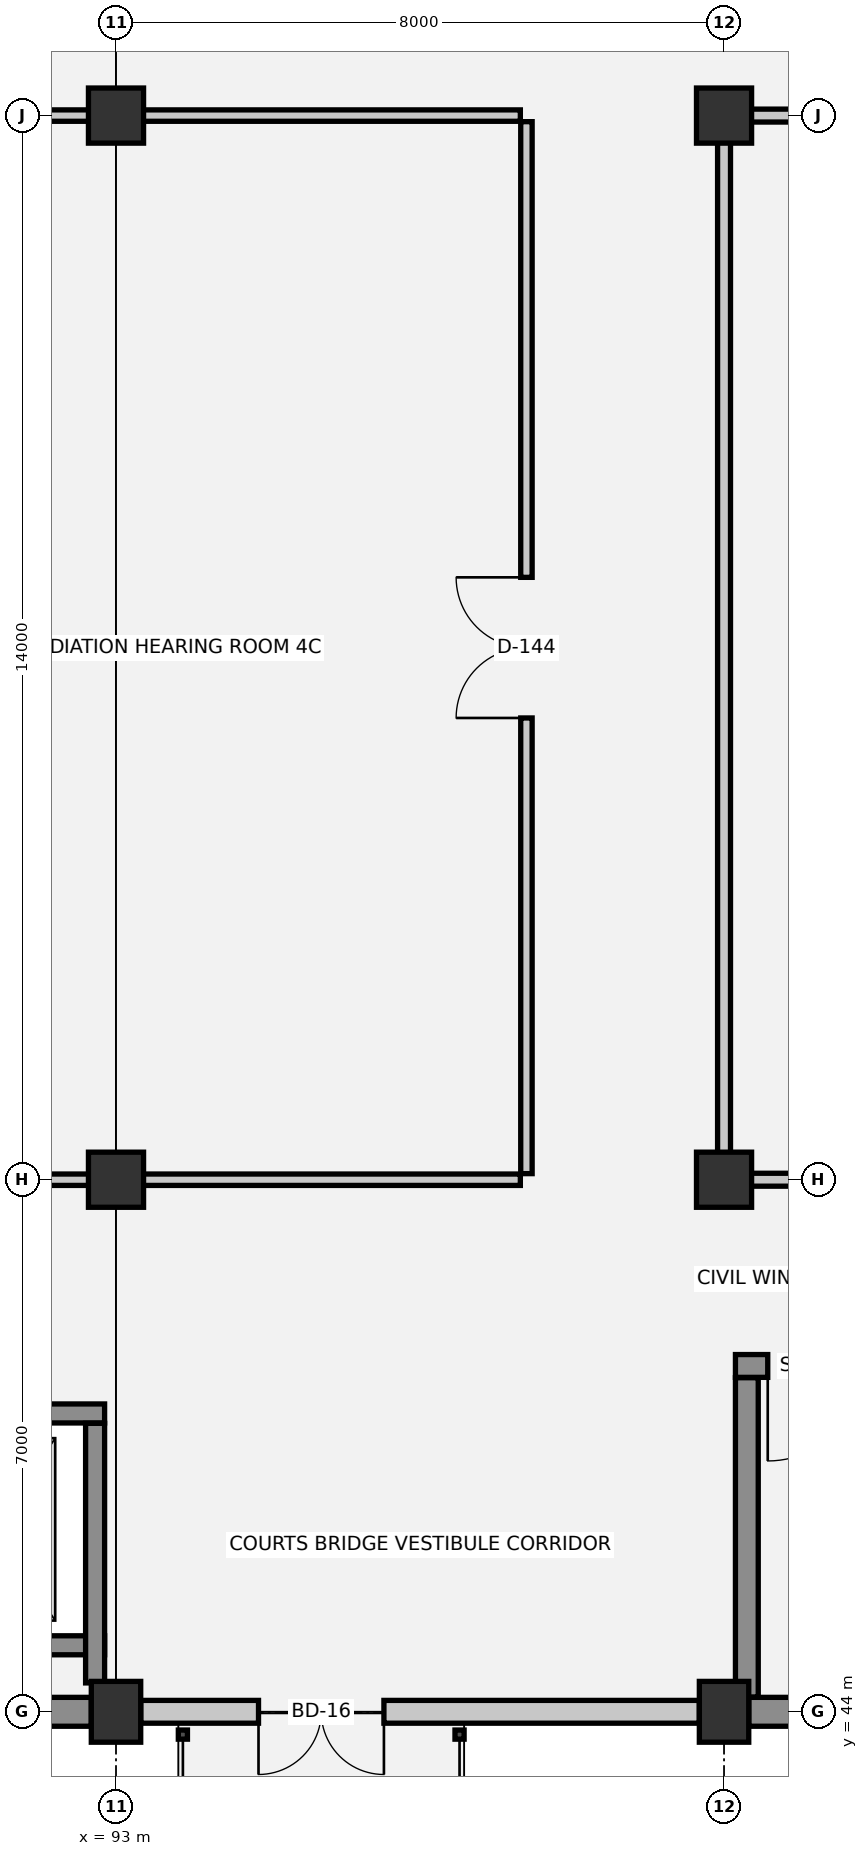
"""IFC4 building model, lengths in metres.
Left out: names, types, materials, properties, quantities, classifications, styles, units other than length and angle.
Written with IfcOpenShell. Run it as: python <this file> out.ifc"""

import sys

from ifc_helpers import new_model, si_unit, direction, frame, frame_2d, origin, origin_2d, place, context, subcontext, project, spatial, rectangle, extrude, element, fill, save


model = new_model("IFC4")
c1 = context("Model", 3, precision=1e-05, world=origin(), true_north=direction((0.0, 1.0)))
c2 = subcontext(c1, "Body", "Model", "MODEL_VIEW")
j1 = project(units=[si_unit("LENGTHUNIT", "METRE"), si_unit("PLANEANGLEUNIT", "RADIAN")], contexts=[c1])
p1 = place(None, origin())
s1 = spatial("IfcSite", under=j1, at=p1, CompositionType="ELEMENT")
p2 = place(p1, origin())
s2 = spatial("IfcBuilding", under=s1, at=p2, CompositionType="ELEMENT")
p3 = place(p2, frame((0.0, 0.0, 14.4)))
s3 = spatial("IfcBuildingStorey", under=s2, at=p3, CompositionType="ELEMENT", Elevation=14.4)
p4 = place(p3, frame((93.0, 44.0, 0.0), z_axis=(0.0, 0.0, 1.0), x_axis=(1.0, 0.0, 0.0)))
e1 = element("IfcColumn", 1, at=p4, inside=s3, PredefinedType="COLUMN", context=c2, shape_type="SweptSolid", body=[
    extrude(rectangle(XDim=0.65, YDim=0.8, at=origin_2d()), origin(), (0.0, 0.0, 1.0), 3.9),
])
for number, where, z_axis, x_axis in (
    (2, (93.0, 51.0, 0.0), (0.0, 0.0, 1.0), (1.0, 0.0, 0.0)),
    (3, (93.0, 65.0, 0.0), (0.0, 0.0, 1.0), (1.0, 0.0, 0.0)),
):
    element("IfcColumn", number, at=place(p3, frame(where, z_axis=z_axis, x_axis=x_axis)), inside=s3, PredefinedType="COLUMN", context=c2, shape_type="SweptSolid", body=[
        extrude(rectangle(XDim=0.725, YDim=0.725, at=origin_2d()), origin(), (0.0, 0.0, 1.0), 3.9),
    ])
p5 = place(p3, frame((101.0, 44.0, 0.0), z_axis=(0.0, 0.0, 1.0), x_axis=(1.0, 0.0, 0.0)))
e4 = element("IfcColumn", 4, at=p5, inside=s3, PredefinedType="COLUMN", context=c2, shape_type="SweptSolid", body=[
    extrude(rectangle(XDim=0.65, YDim=0.8, at=origin_2d()), origin(), (0.0, 0.0, 1.0), 3.9),
])
for number, where, z_axis, x_axis in (
    (5, (101.0, 51.0, 0.0), (0.0, 0.0, 1.0), (1.0, 0.0, 0.0)),
    (6, (101.0, 65.0, 0.0), (0.0, 0.0, 1.0), (1.0, 0.0, 0.0)),
):
    element("IfcColumn", number, at=place(p3, frame(where, z_axis=z_axis, x_axis=x_axis)), inside=s3, PredefinedType="COLUMN", context=c2, shape_type="SweptSolid", body=[
        extrude(rectangle(XDim=0.725, YDim=0.725, at=origin_2d()), origin(), (0.0, 0.0, 1.0), 3.9),
    ])
p6 = place(p3, frame((108.675, 44.0, 0.0), z_axis=(0.0, 0.0, 1.0), x_axis=(-1.0, 0.0, 0.0)))
e7 = element("IfcWall", 7, at=p6, inside=s3, PredefinedType="STANDARD", context=c2, shape_type="SweptSolid", body=[
    extrude(rectangle(XDim=7.35, YDim=0.38, at=frame_2d((3.675, 0.0))), origin(), (0.0, 0.0, 1.0), 2.61),
])
p7 = place(p3, frame((100.675, 44.0, 0.0), z_axis=(0.0, 0.0, 1.0), x_axis=(-1.0, 0.0, 0.0)))
e8 = element("IfcWall", 8, at=p7, inside=s3, PredefinedType="SOLIDWALL", context=c2, shape_type="SweptSolid", body=[
    extrude(rectangle(XDim=7.35, YDim=0.3, at=frame_2d((3.675, 0.0))), origin(), (0.0, 0.0, 1.0), 2.61),
])
p8 = place(p7, frame((4.15, 0.0, 0.0)))
e9 = element("IfcOpeningElement", 9, at=p8, cuts=e8, PredefinedType="OPENING", context=c2, shape_type="SweptSolid", body=[
    extrude(rectangle(XDim=1.65, YDim=2.2, at=frame_2d((0.825, 1.1))), frame((0.0, 0.16, 0.0), z_axis=(0.0, -1.0, 0.0), x_axis=(1.0, 0.0, 0.0)), (0.0, 0.0, 1.0), 0.32),
])
p9 = place(p3, frame((92.675, 44.0, 0.0), z_axis=(0.0, 0.0, 1.0), x_axis=(-1.0, 0.0, 0.0)))
e10 = element("IfcWall", 10, at=p9, inside=s3, PredefinedType="STANDARD", context=c2, shape_type="SweptSolid", body=[
    extrude(rectangle(XDim=7.35, YDim=0.38, at=frame_2d((3.675, 0.0))), origin(), (0.0, 0.0, 1.0), 2.61),
])
for number, where, z_axis, x_axis in (
    (11, (89.95, 44.875, 0.0), (0.0, 0.0, 1.0), (1.0, 0.0, 0.0)),
    (12, (92.85, 47.925, 0.0), (0.0, 0.0, 1.0), (-1.0, 0.0, 0.0)),
):
    element("IfcWall", number, at=place(p3, frame(where, z_axis=z_axis, x_axis=x_axis)), inside=s3, PredefinedType="SHEAR", context=c2, shape_type="SweptSolid", body=[
        extrude(rectangle(XDim=2.9, YDim=0.25, at=frame_2d((1.45, 0.0))), origin(), (0.0, 0.0, 1.0), 3.9),
    ])
p10 = place(p3, frame((92.725, 44.38, 0.0), z_axis=(0.0, 0.0, 1.0), x_axis=(0.0, 1.0, 0.0)))
e13 = element("IfcWall", 13, at=p10, inside=s3, PredefinedType="SHEAR", context=c2, shape_type="SweptSolid", body=[
    extrude(rectangle(XDim=3.415, YDim=0.25, at=frame_2d((1.708, 0.0))), origin(), (0.0, 0.0, 1.0), 3.9),
])
p11 = place(p3, frame((108.85, 48.55, 0.0), z_axis=(0.0, 0.0, 1.0), x_axis=(-1.0, 0.0, 0.0)))
e14 = element("IfcWall", 14, at=p11, inside=s3, PredefinedType="SHEAR", context=c2, shape_type="SweptSolid", body=[
    extrude(rectangle(XDim=7.7, YDim=0.3, at=frame_2d((3.85, 0.0))), origin(), (0.0, 0.0, 1.0), 3.62),
])
p12 = place(p11, frame((6.025, 0.0, 0.0)))
e15 = element("IfcOpeningElement", 15, at=p12, cuts=e14, PredefinedType="OPENING", context=c2, shape_type="SweptSolid", body=[
    extrude(rectangle(XDim=1.25, YDim=2.15, at=frame_2d((0.625, 1.075))), frame((0.0, 0.16, 0.0), z_axis=(0.0, -1.0, 0.0), x_axis=(1.0, 0.0, 0.0)), (0.0, 0.0, 1.0), 0.32),
])
p13 = place(p3, frame((101.3, 48.395, 0.0), z_axis=(0.0, 0.0, 1.0), x_axis=(0.0, -1.0, 0.0)))
e16 = element("IfcWall", 16, at=p13, inside=s3, PredefinedType="SHEAR", context=c2, shape_type="SweptSolid", body=[
    extrude(rectangle(XDim=4.2, YDim=0.3, at=frame_2d((2.1, 0.0))), origin(), (0.0, 0.0, 1.0), 3.62),
])
p14 = place(p3, frame((89.12, 51.0, 0.0), z_axis=(0.0, 0.0, 1.0), x_axis=(1.0, 0.0, 0.0)))
e17 = element("IfcWall", 17, at=p14, inside=s3, PredefinedType="PARTITIONING", context=c2, shape_type="SweptSolid", body=[
    extrude(rectangle(XDim=9.2, YDim=0.15, at=frame_2d((4.6, 0.0))), origin(), (0.0, 0.0, 1.0), 2.93),
])
p15 = place(p3, frame((101.08, 51.0, 0.0), z_axis=(0.0, 0.0, 1.0), x_axis=(1.0, 0.0, 0.0)))
e18 = element("IfcWall", 18, at=p15, inside=s3, PredefinedType="PARTITIONING", context=c2, shape_type="SweptSolid", body=[
    extrude(rectangle(XDim=22.84, YDim=0.17, at=frame_2d((11.42, 0.0))), origin(), (0.0, 0.0, 1.0), 2.93),
])
p16 = place(p15, frame((10.445, 0.0, 0.0)))
e19 = element("IfcOpeningElement", 19, at=p16, cuts=e18, PredefinedType="OPENING", context=c2, shape_type="SweptSolid", body=[
    extrude(rectangle(XDim=1.95, YDim=2.35, at=frame_2d((0.975, 1.175))), frame((0.0, 0.095, 0.0), z_axis=(0.0, -1.0, 0.0), x_axis=(1.0, 0.0, 0.0)), (0.0, 0.0, 1.0), 0.19),
])
p17 = place(p3, frame((89.12, 65.0, 0.0), z_axis=(0.0, 0.0, 1.0), x_axis=(1.0, 0.0, 0.0)))
e20 = element("IfcWall", 20, at=p17, inside=s3, PredefinedType="PARTITIONING", context=c2, shape_type="SweptSolid", body=[
    extrude(rectangle(XDim=9.2, YDim=0.15, at=frame_2d((4.6, 0.0))), origin(), (0.0, 0.0, 1.0), 2.93),
])
p18 = place(p3, frame((101.08, 65.0, 0.0), z_axis=(0.0, 0.0, 1.0), x_axis=(1.0, 0.0, 0.0)))
e21 = element("IfcWall", 21, at=p18, inside=s3, PredefinedType="PARTITIONING", context=c2, shape_type="SweptSolid", body=[
    extrude(rectangle(XDim=22.84, YDim=0.17, at=frame_2d((11.42, 0.0))), origin(), (0.0, 0.0, 1.0), 2.93),
])
p19 = place(p3, frame((98.4, 51.08, 0.0), z_axis=(0.0, 0.0, 1.0), x_axis=(0.0, 1.0, 0.0)))
e22 = element("IfcWall", 22, at=p19, inside=s3, PredefinedType="PARTITIONING", context=c2, shape_type="SweptSolid", body=[
    extrude(rectangle(XDim=13.84, YDim=0.15, at=frame_2d((6.92, 0.0))), origin(), (0.0, 0.0, 1.0), 3.54),
])
p20 = place(p19, frame((5.995, 0.0, 0.0)))
e23 = element("IfcOpeningElement", 23, at=p20, cuts=e22, PredefinedType="OPENING", context=c2, shape_type="SweptSolid", body=[
    extrude(rectangle(XDim=1.85, YDim=2.3, at=frame_2d((0.925, 1.15))), frame((0.0, 0.085, 0.0), z_axis=(0.0, -1.0, 0.0), x_axis=(1.0, 0.0, 0.0)), (0.0, 0.0, 1.0), 0.17),
])
p21 = place(p3, frame((101.0, 51.08, 0.0), z_axis=(0.0, 0.0, 1.0), x_axis=(0.0, 1.0, 0.0)))
e24 = element("IfcWall", 24, at=p21, inside=s3, PredefinedType="PARTITIONING", context=c2, shape_type="SweptSolid", body=[
    extrude(rectangle(XDim=13.84, YDim=0.17, at=frame_2d((6.92, 0.0))), origin(), (0.0, 0.0, 1.0), 2.63),
])
p22 = place(p8, origin())
e25 = element("IfcDoor", 25, at=p22, inside=s3, OperationType="DOUBLE_DOOR_SINGLE_SWING", PredefinedType="DOOR", context=c2, shape_type="SweptSolid", body=[
    extrude(rectangle(XDim=1.65, YDim=2.2, at=frame_2d((0.825, 1.1))), frame((0.0, 0.025, 0.0), z_axis=(0.0, -1.0, 0.0), x_axis=(1.0, 0.0, 0.0)), (0.0, 0.0, 1.0), 0.05),
])
fill(e9, e25)
p23 = place(p12, origin())
e26 = element("IfcDoor", 26, at=p23, inside=s3, OperationType="SINGLE_SWING_RIGHT", PredefinedType="DOOR", context=c2, shape_type="SweptSolid", body=[
    extrude(rectangle(XDim=1.25, YDim=2.15, at=frame_2d((0.625, 1.075))), frame((0.0, 0.025, 0.0), z_axis=(0.0, -1.0, 0.0), x_axis=(1.0, 0.0, 0.0)), (0.0, 0.0, 1.0), 0.05),
])
fill(e15, e26)
p24 = place(p20, origin())
e27 = element("IfcDoor", 27, at=p24, inside=s3, OperationType="DOUBLE_DOOR_SINGLE_SWING", PredefinedType="DOOR", context=c2, shape_type="SweptSolid", body=[
    extrude(rectangle(XDim=1.85, YDim=2.3, at=frame_2d((0.925, 1.15))), frame((0.0, 0.025, 0.0), z_axis=(0.0, -1.0, 0.0), x_axis=(1.0, 0.0, 0.0)), (0.0, 0.0, 1.0), 0.05),
])
fill(e23, e27)
save(model, sys.argv[1])
